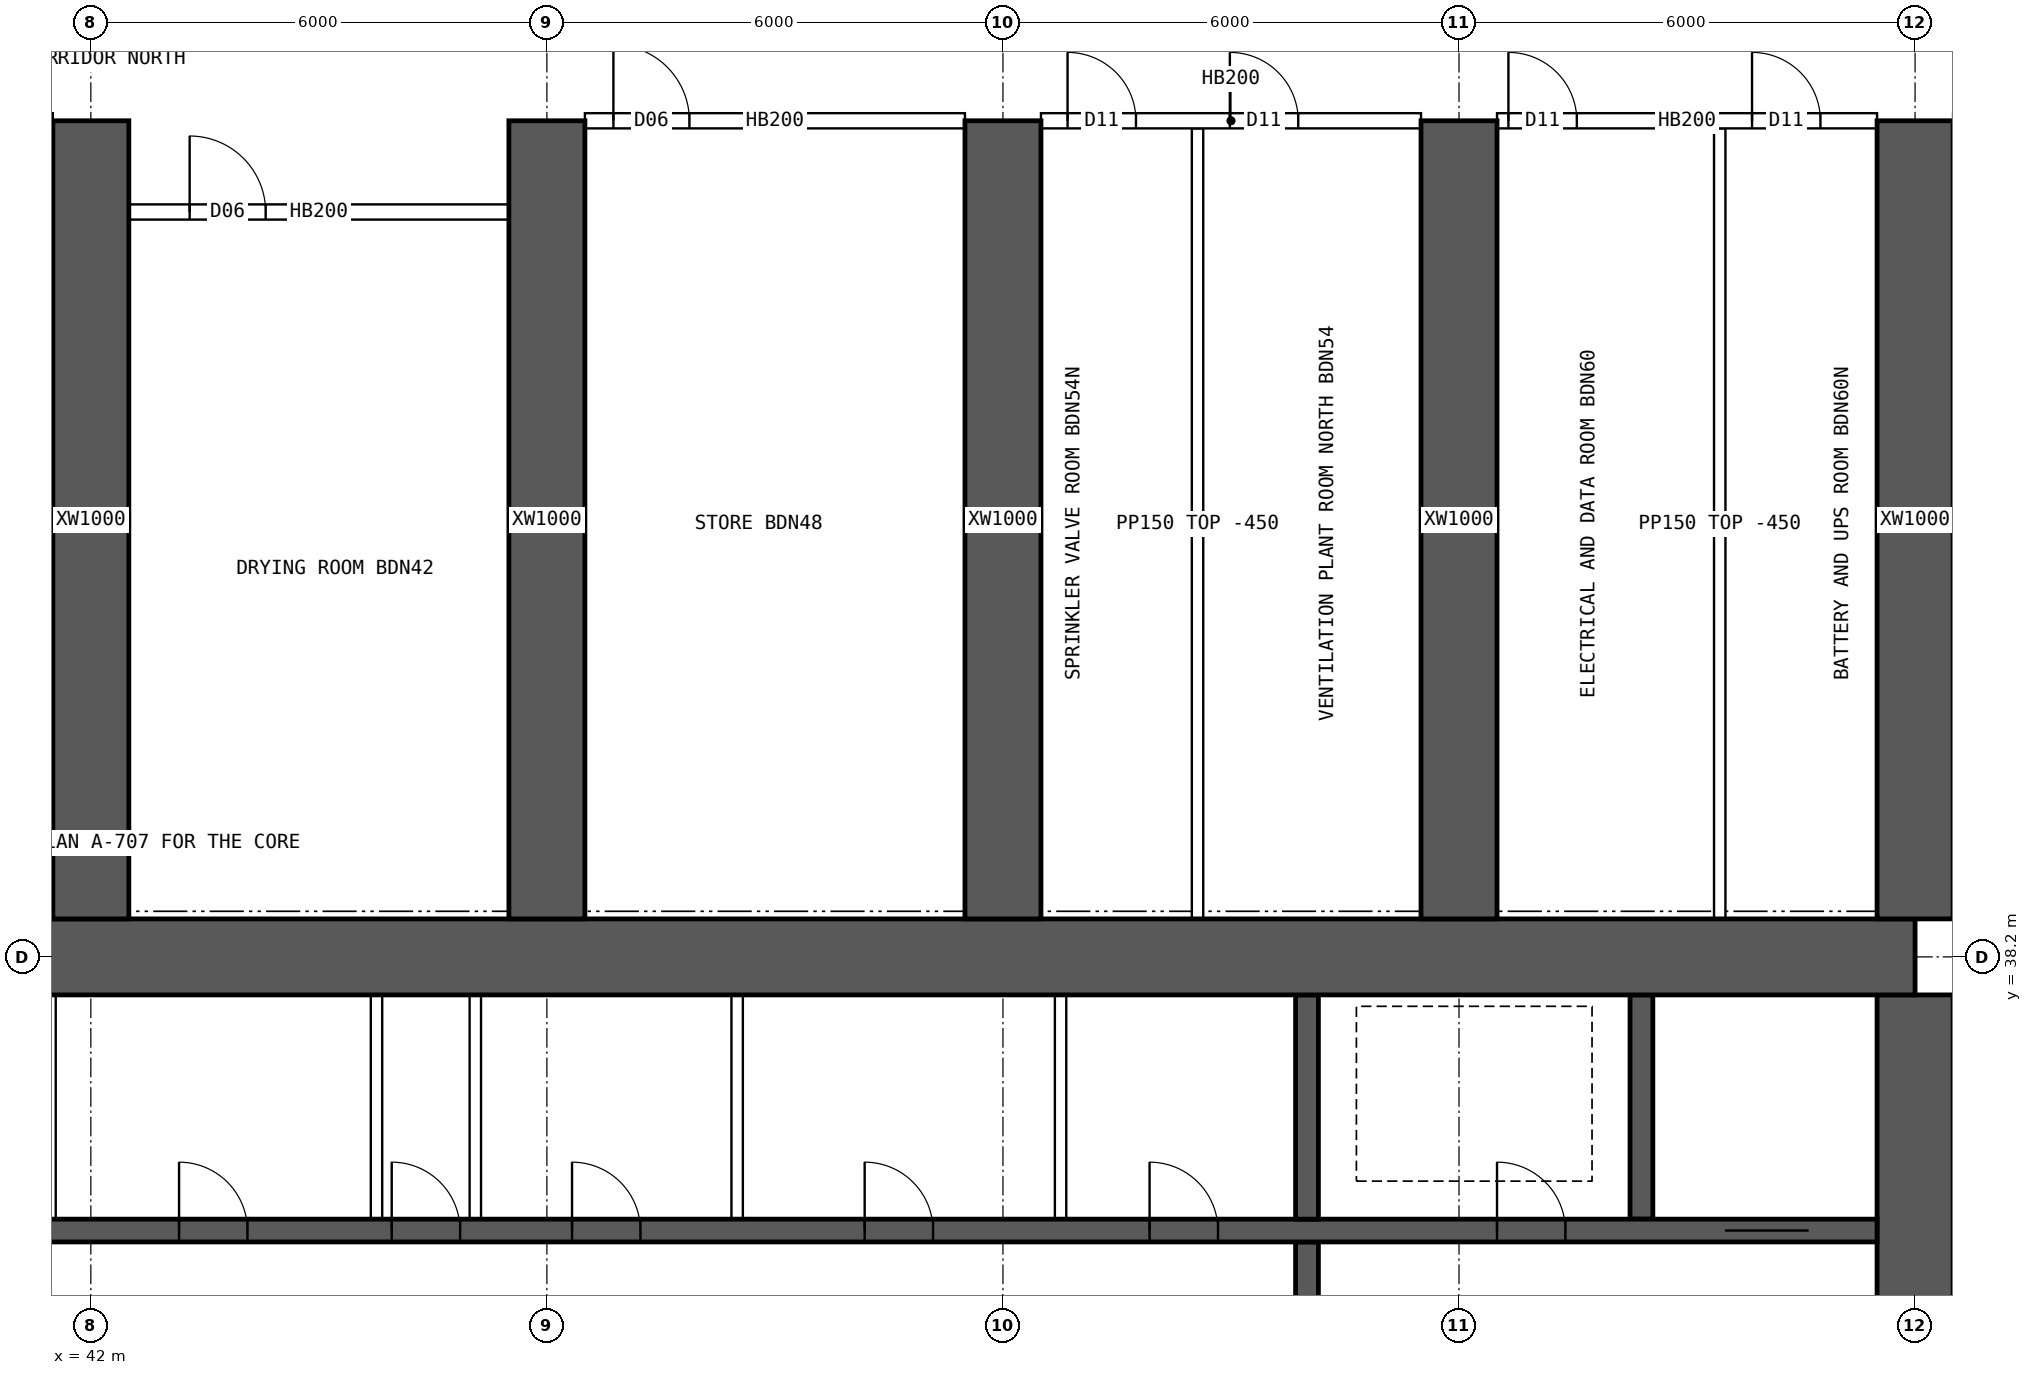
"""IFC4 building model, lengths in metres.
Left out: names, types, materials, properties, quantities, classifications, styles, units other than length and angle.
Written with IfcOpenShell. Run it as: python <this file> out.ifc"""

import sys

from ifc_helpers import new_model, si_unit, direction, frame, frame_2d, origin, place, context, subcontext, project, spatial, rectangle, extrude, element, fill, save


model = new_model("IFC4")
c1 = context("Model", 3, precision=1e-05, world=origin(), true_north=direction((0.0, 1.0)))
c2 = subcontext(c1, "Body", "Model", "MODEL_VIEW")
j1 = project(units=[si_unit("LENGTHUNIT", "METRE"), si_unit("PLANEANGLEUNIT", "RADIAN")], contexts=[c1])
p1 = place(None, origin())
s1 = spatial("IfcSite", under=j1, at=p1, CompositionType="ELEMENT")
p2 = place(p1, origin())
s2 = spatial("IfcBuilding", under=s1, at=p2, CompositionType="ELEMENT")
p3 = place(p2, frame((0.0, 0.0, 20.2)))
s3 = spatial("IfcBuildingStorey", under=s2, at=p3, CompositionType="ELEMENT", Elevation=20.2)
p4 = place(p3, frame((18.0, 38.2, 0.0), z_axis=(0.0, 0.0, 1.0), x_axis=(1.0, 0.0, 0.0)))
e1 = element("IfcWall", 1, at=p4, inside=s3, PredefinedType="SHEAR", context=c2, shape_type="SweptSolid", body=[
    extrude(rectangle(XDim=48.0, YDim=1.0, at=frame_2d((24.0, 0.0))), origin(), (0.0, 0.0, 1.0), 3.75),
])
p5 = place(p3, frame((66.0, 26.3, 0.0), z_axis=(0.0, 0.0, 1.0), x_axis=(0.0, 1.0, 0.0)))
e2 = element("IfcWall", 2, at=p5, inside=s3, PredefinedType="SHEAR", context=c2, shape_type="SweptSolid", body=[
    extrude(rectangle(XDim=11.4, YDim=1.0, at=frame_2d((5.7, 0.0))), origin(), (0.0, 0.0, 1.0), 3.75),
])
p6 = place(p5, frame((5.0, 0.0, 0.0)))
e3 = element("IfcOpeningElement", 3, at=p6, cuts=e2, PredefinedType="OPENING", context=c2, shape_type="SweptSolid", body=[
    extrude(rectangle(XDim=1.2, YDim=2.1, at=frame_2d((0.6, 1.05))), frame((0.0, 0.51, 0.0), z_axis=(0.0, -1.0, 0.0), x_axis=(1.0, 0.0, 0.0)), (0.0, 0.0, 1.0), 1.02),
])
p7 = place(p3, frame((18.5, 34.6, 0.0), z_axis=(0.0, 0.0, 1.0), x_axis=(1.0, 0.0, 0.0)))
e4 = element("IfcWall", 4, at=p7, inside=s3, PredefinedType="SHEAR", context=c2, shape_type="SweptSolid", body=[
    extrude(rectangle(XDim=47.0, YDim=0.3, at=frame_2d((23.5, 0.0))), origin(), (0.0, 0.0, 1.0), 3.75),
])
p8 = place(p7, frame((0.9, 0.0, 0.0)))
e5 = element("IfcOpeningElement", 5, at=p8, cuts=e4, PredefinedType="OPENING", context=c2, shape_type="SweptSolid", body=[
    extrude(rectangle(XDim=1.1, YDim=2.1, at=frame_2d((0.55, 1.05))), frame((0.0, 0.16, 0.0), z_axis=(0.0, -1.0, 0.0), x_axis=(1.0, 0.0, 0.0)), (0.0, 0.0, 1.0), 0.32),
])
p9 = place(p7, frame((45.0, 0.0, 0.0)))
e6 = element("IfcOpeningElement", 6, at=p9, cuts=e4, PredefinedType="OPENING", context=c2, shape_type="SweptSolid", body=[
    extrude(rectangle(XDim=1.1, YDim=2.1, at=frame_2d((0.55, 1.05))), frame((0.0, 0.16, 0.0), z_axis=(0.0, -1.0, 0.0), x_axis=(1.0, 0.0, 0.0)), (0.0, 0.0, 1.0), 0.32),
])
p10 = place(p7, frame((4.1, 0.0, 0.0)))
e7 = element("IfcOpeningElement", 7, at=p10, cuts=e4, PredefinedType="OPENING", context=c2, shape_type="SweptSolid", body=[
    extrude(rectangle(XDim=0.9, YDim=2.1, at=frame_2d((0.45, 1.05))), frame((0.0, 0.16, 0.0), z_axis=(0.0, -1.0, 0.0), x_axis=(1.0, 0.0, 0.0)), (0.0, 0.0, 1.0), 0.32),
])
p11 = place(p7, frame((42.0, 0.0, 0.0)))
e8 = element("IfcOpeningElement", 8, at=p11, cuts=e4, PredefinedType="OPENING", context=c2, shape_type="SweptSolid", body=[
    extrude(rectangle(XDim=0.9, YDim=2.1, at=frame_2d((0.45, 1.05))), frame((0.0, 0.16, 0.0), z_axis=(0.0, -1.0, 0.0), x_axis=(1.0, 0.0, 0.0)), (0.0, 0.0, 1.0), 0.32),
])
p12 = place(p7, frame((8.875, 0.0, 0.0)))
e9 = element("IfcOpeningElement", 9, at=p12, cuts=e4, PredefinedType="OPENING", context=c2, shape_type="SweptSolid", body=[
    extrude(rectangle(XDim=0.9, YDim=2.1, at=frame_2d((0.45, 1.05))), frame((0.0, 0.16, 0.0), z_axis=(0.0, -1.0, 0.0), x_axis=(1.0, 0.0, 0.0)), (0.0, 0.0, 1.0), 0.32),
])
p13 = place(p7, frame((12.849, 0.0, 0.0)))
e10 = element("IfcOpeningElement", 10, at=p13, cuts=e4, PredefinedType="OPENING", context=c2, shape_type="SweptSolid", body=[
    extrude(rectangle(XDim=0.9, YDim=2.1, at=frame_2d((0.45, 1.05))), frame((0.0, 0.16, 0.0), z_axis=(0.0, -1.0, 0.0), x_axis=(1.0, 0.0, 0.0)), (0.0, 0.0, 1.0), 0.32),
])
p14 = place(p7, frame((16.496, 0.0, 0.0)))
e11 = element("IfcOpeningElement", 11, at=p14, cuts=e4, PredefinedType="OPENING", context=c2, shape_type="SweptSolid", body=[
    extrude(rectangle(XDim=0.9, YDim=2.1, at=frame_2d((0.45, 1.05))), frame((0.0, 0.16, 0.0), z_axis=(0.0, -1.0, 0.0), x_axis=(1.0, 0.0, 0.0)), (0.0, 0.0, 1.0), 0.32),
])
p15 = place(p7, frame((20.255, 0.0, 0.0)))
e12 = element("IfcOpeningElement", 12, at=p15, cuts=e4, PredefinedType="OPENING", context=c2, shape_type="SweptSolid", body=[
    extrude(rectangle(XDim=0.9, YDim=2.1, at=frame_2d((0.45, 1.05))), frame((0.0, 0.16, 0.0), z_axis=(0.0, -1.0, 0.0), x_axis=(1.0, 0.0, 0.0)), (0.0, 0.0, 1.0), 0.32),
])
p16 = place(p7, frame((24.661, 0.0, 0.0)))
e13 = element("IfcOpeningElement", 13, at=p16, cuts=e4, PredefinedType="OPENING", context=c2, shape_type="SweptSolid", body=[
    extrude(rectangle(XDim=0.9, YDim=2.1, at=frame_2d((0.45, 1.05))), frame((0.0, 0.16, 0.0), z_axis=(0.0, -1.0, 0.0), x_axis=(1.0, 0.0, 0.0)), (0.0, 0.0, 1.0), 0.32),
])
p17 = place(p7, frame((27.458, 0.0, 0.0)))
e14 = element("IfcOpeningElement", 14, at=p17, cuts=e4, PredefinedType="OPENING", context=c2, shape_type="SweptSolid", body=[
    extrude(rectangle(XDim=0.9, YDim=2.1, at=frame_2d((0.45, 1.05))), frame((0.0, 0.16, 0.0), z_axis=(0.0, -1.0, 0.0), x_axis=(1.0, 0.0, 0.0)), (0.0, 0.0, 1.0), 0.32),
])
p18 = place(p7, frame((29.831, 0.0, 0.0)))
e15 = element("IfcOpeningElement", 15, at=p18, cuts=e4, PredefinedType="OPENING", context=c2, shape_type="SweptSolid", body=[
    extrude(rectangle(XDim=0.9, YDim=2.1, at=frame_2d((0.45, 1.05))), frame((0.0, 0.16, 0.0), z_axis=(0.0, -1.0, 0.0), x_axis=(1.0, 0.0, 0.0)), (0.0, 0.0, 1.0), 0.32),
])
p19 = place(p7, frame((33.68, 0.0, 0.0)))
e16 = element("IfcOpeningElement", 16, at=p19, cuts=e4, PredefinedType="OPENING", context=c2, shape_type="SweptSolid", body=[
    extrude(rectangle(XDim=0.9, YDim=2.1, at=frame_2d((0.45, 1.05))), frame((0.0, 0.16, 0.0), z_axis=(0.0, -1.0, 0.0), x_axis=(1.0, 0.0, 0.0)), (0.0, 0.0, 1.0), 0.32),
])
p20 = place(p7, frame((37.429, 0.0, 0.0)))
e17 = element("IfcOpeningElement", 17, at=p20, cuts=e4, PredefinedType="OPENING", context=c2, shape_type="SweptSolid", body=[
    extrude(rectangle(XDim=0.9, YDim=2.1, at=frame_2d((0.45, 1.05))), frame((0.0, 0.16, 0.0), z_axis=(0.0, -1.0, 0.0), x_axis=(1.0, 0.0, 0.0)), (0.0, 0.0, 1.0), 0.32),
])
p21 = place(p3, frame((58.0, 30.55, 0.0), z_axis=(0.0, 0.0, 1.0), x_axis=(0.0, 1.0, 0.0)))
e18 = element("IfcWall", 18, at=p21, inside=s3, PredefinedType="SHEAR", context=c2, shape_type="SweptSolid", body=[
    extrude(rectangle(XDim=3.9, YDim=0.3, at=frame_2d((1.95, 0.0))), origin(), (0.0, 0.0, 1.0), 3.75),
])
p22 = place(p21, frame((1.4, 0.0, 0.0)))
e19 = element("IfcOpeningElement", 19, at=p22, cuts=e18, PredefinedType="OPENING", context=c2, shape_type="SweptSolid", body=[
    extrude(rectangle(XDim=1.2, YDim=2.1, at=frame_2d((0.6, 1.05))), frame((0.0, 0.16, 0.0), z_axis=(0.0, -1.0, 0.0), x_axis=(1.0, 0.0, 0.0)), (0.0, 0.0, 1.0), 0.32),
])
for number, where, z_axis, x_axis in (
    (20, (62.4, 34.75, 0.0), (0.0, 0.0, 1.0), (0.0, 1.0, 0.0)),
    (21, (58.0, 34.75, 0.0), (0.0, 0.0, 1.0), (0.0, 1.0, 0.0)),
):
    element("IfcWall", number, at=place(p3, frame(where, z_axis=z_axis, x_axis=x_axis)), inside=s3, PredefinedType="SHEAR", context=c2, shape_type="SweptSolid", body=[
        extrude(rectangle(XDim=2.95, YDim=0.3, at=frame_2d((1.475, 0.0))), origin(), (0.0, 0.0, 1.0), 3.75),
    ])
for number, where, z_axis, x_axis in (
    (22, (42.0, 38.7, 0.0), (0.0, 0.0, 1.0), (0.0, 1.0, 0.0)),
    (23, (48.0, 38.7, 0.0), (0.0, 0.0, 1.0), (0.0, 1.0, 0.0)),
    (24, (54.0, 38.7, 0.0), (0.0, 0.0, 1.0), (0.0, 1.0, 0.0)),
    (25, (60.0, 38.7, 0.0), (0.0, 0.0, 1.0), (0.0, 1.0, 0.0)),
    (26, (66.0, 38.7, 0.0), (0.0, 0.0, 1.0), (0.0, 1.0, 0.0)),
):
    element("IfcWall", number, at=place(p3, frame(where, z_axis=z_axis, x_axis=x_axis)), inside=s3, PredefinedType="SHEAR", context=c2, shape_type="SweptSolid", body=[
        extrude(rectangle(XDim=10.5, YDim=1.0, at=frame_2d((5.25, 0.0))), origin(), (0.0, 0.0, 1.0), 3.75),
    ])
for number, where, z_axis, x_axis in (
    (27, (41.463, 34.75, 0.0), (0.0, 0.0, 1.0), (0.0, 1.0, 0.0)),
    (28, (45.758, 34.75, 0.0), (0.0, 0.0, 1.0), (0.0, 1.0, 0.0)),
    (29, (47.058, 34.75, 0.0), (0.0, 0.0, 1.0), (0.0, 1.0, 0.0)),
    (30, (50.503, 34.75, 0.0), (0.0, 0.0, 1.0), (0.0, 1.0, 0.0)),
    (31, (54.758, 34.75, 0.0), (0.0, 0.0, 1.0), (0.0, 1.0, 0.0)),
):
    element("IfcWall", number, at=place(p3, frame(where, z_axis=z_axis, x_axis=x_axis)), inside=s3, PredefinedType="SOLIDWALL", context=c2, shape_type="SweptSolid", body=[
        extrude(rectangle(XDim=2.95, YDim=0.15, at=frame_2d((1.475, 0.0))), origin(), (0.0, 0.0, 1.0), 3.3),
    ])
p23 = place(p3, frame((48.5, 49.2, 0.0), z_axis=(0.0, 0.0, 1.0), x_axis=(1.0, 0.0, 0.0)))
e32 = element("IfcWall", 32, at=p23, inside=s3, PredefinedType="SOLIDWALL", context=c2, shape_type="SweptSolid", body=[
    extrude(rectangle(XDim=5.0, YDim=0.2, at=frame_2d((2.5, 0.0))), origin(), (0.0, 0.0, 1.0), 3.3),
])
p24 = place(p23, frame((0.375, 0.0, 0.0)))
e33 = element("IfcOpeningElement", 33, at=p24, cuts=e32, PredefinedType="OPENING", context=c2, shape_type="SweptSolid", body=[
    extrude(rectangle(XDim=1.0, YDim=2.1, at=frame_2d((0.5, 1.05))), frame((0.0, 0.11, 0.0), z_axis=(0.0, -1.0, 0.0), x_axis=(1.0, 0.0, 0.0)), (0.0, 0.0, 1.0), 0.22),
])
p25 = place(p3, frame((54.5, 49.2, 0.0), z_axis=(0.0, 0.0, 1.0), x_axis=(1.0, 0.0, 0.0)))
e34 = element("IfcWall", 34, at=p25, inside=s3, PredefinedType="SOLIDWALL", context=c2, shape_type="SweptSolid", body=[
    extrude(rectangle(XDim=5.0, YDim=0.2, at=frame_2d((2.5, 0.0))), origin(), (0.0, 0.0, 1.0), 3.3),
])
p26 = place(p25, frame((0.35, 0.0, 0.0)))
e35 = element("IfcOpeningElement", 35, at=p26, cuts=e34, PredefinedType="OPENING", context=c2, shape_type="SweptSolid", body=[
    extrude(rectangle(XDim=0.9, YDim=2.1, at=frame_2d((0.45, 1.05))), frame((0.0, 0.11, 0.0), z_axis=(0.0, -1.0, 0.0), x_axis=(1.0, 0.0, 0.0)), (0.0, 0.0, 1.0), 0.22),
])
p27 = place(p25, frame((2.485, 0.0, 0.0)))
e36 = element("IfcOpeningElement", 36, at=p27, cuts=e34, PredefinedType="OPENING", context=c2, shape_type="SweptSolid", body=[
    extrude(rectangle(XDim=0.9, YDim=2.1, at=frame_2d((0.45, 1.05))), frame((0.0, 0.11, 0.0), z_axis=(0.0, -1.0, 0.0), x_axis=(1.0, 0.0, 0.0)), (0.0, 0.0, 1.0), 0.22),
])
p28 = place(p3, frame((60.5, 49.2, 0.0), z_axis=(0.0, 0.0, 1.0), x_axis=(1.0, 0.0, 0.0)))
e37 = element("IfcWall", 37, at=p28, inside=s3, PredefinedType="SOLIDWALL", context=c2, shape_type="SweptSolid", body=[
    extrude(rectangle(XDim=5.0, YDim=0.2, at=frame_2d((2.5, 0.0))), origin(), (0.0, 0.0, 1.0), 3.3),
])
p29 = place(p28, frame((0.15, 0.0, 0.0)))
e38 = element("IfcOpeningElement", 38, at=p29, cuts=e37, PredefinedType="OPENING", context=c2, shape_type="SweptSolid", body=[
    extrude(rectangle(XDim=0.9, YDim=2.1, at=frame_2d((0.45, 1.05))), frame((0.0, 0.11, 0.0), z_axis=(0.0, -1.0, 0.0), x_axis=(1.0, 0.0, 0.0)), (0.0, 0.0, 1.0), 0.22),
])
p30 = place(p28, frame((3.355, 0.0, 0.0)))
e39 = element("IfcOpeningElement", 39, at=p30, cuts=e37, PredefinedType="OPENING", context=c2, shape_type="SweptSolid", body=[
    extrude(rectangle(XDim=0.9, YDim=2.1, at=frame_2d((0.45, 1.05))), frame((0.0, 0.11, 0.0), z_axis=(0.0, -1.0, 0.0), x_axis=(1.0, 0.0, 0.0)), (0.0, 0.0, 1.0), 0.22),
])
p31 = place(p3, frame((42.5, 48.0, 0.0), z_axis=(0.0, 0.0, 1.0), x_axis=(1.0, 0.0, 0.0)))
e40 = element("IfcWall", 40, at=p31, inside=s3, PredefinedType="SOLIDWALL", context=c2, shape_type="SweptSolid", body=[
    extrude(rectangle(XDim=5.0, YDim=0.2, at=frame_2d((2.5, 0.0))), origin(), (0.0, 0.0, 1.0), 3.3),
])
p32 = place(p31, frame((0.8, 0.0, 0.0)))
e41 = element("IfcOpeningElement", 41, at=p32, cuts=e40, PredefinedType="OPENING", context=c2, shape_type="SweptSolid", body=[
    extrude(rectangle(XDim=1.0, YDim=2.1, at=frame_2d((0.5, 1.05))), frame((0.0, 0.11, 0.0), z_axis=(0.0, -1.0, 0.0), x_axis=(1.0, 0.0, 0.0)), (0.0, 0.0, 1.0), 0.22),
])
for number, where, z_axis, x_axis in (
    (42, (56.56, 38.7, 0.0), (0.0, 0.0, 1.0), (0.0, 1.0, 0.0)),
    (43, (63.43, 38.7, 0.0), (0.0, 0.0, 1.0), (0.0, 1.0, 0.0)),
):
    element("IfcWall", number, at=place(p3, frame(where, z_axis=z_axis, x_axis=x_axis)), inside=s3, PredefinedType="PARTITIONING", context=c2, shape_type="SweptSolid", body=[
        extrude(rectangle(XDim=10.4, YDim=0.15, at=frame_2d((5.2, 0.0))), origin(), (0.0, 0.0, 1.0), 3.3),
    ])
p33 = place(p9, origin())
e44 = element("IfcDoor", 44, at=p33, inside=s3, OperationType="DOUBLE_DOOR_SLIDING", PredefinedType="DOOR", context=c2, shape_type="SweptSolid", body=[
    extrude(rectangle(XDim=1.1, YDim=2.1, at=frame_2d((0.55, 1.05))), frame((0.0, 0.025, 0.0), z_axis=(0.0, -1.0, 0.0), x_axis=(1.0, 0.0, 0.0)), (0.0, 0.0, 1.0), 0.05),
])
fill(e6, e44)
p34 = place(p11, origin())
e45 = element("IfcDoor", 45, at=p34, inside=s3, OperationType="SINGLE_SWING_LEFT", PredefinedType="DOOR", context=c2, shape_type="SweptSolid", body=[
    extrude(rectangle(XDim=0.9, YDim=2.1, at=frame_2d((0.45, 1.05))), frame((0.0, 0.025, 0.0), z_axis=(0.0, -1.0, 0.0), x_axis=(1.0, 0.0, 0.0)), (0.0, 0.0, 1.0), 0.05),
])
fill(e8, e45)
p35 = place(p16, origin())
e46 = element("IfcDoor", 46, at=p35, inside=s3, OperationType="SINGLE_SWING_LEFT", PredefinedType="DOOR", context=c2, shape_type="SweptSolid", body=[
    extrude(rectangle(XDim=0.9, YDim=2.1, at=frame_2d((0.45, 1.05))), frame((0.0, 0.025, 0.0), z_axis=(0.0, -1.0, 0.0), x_axis=(1.0, 0.0, 0.0)), (0.0, 0.0, 1.0), 0.05),
])
fill(e13, e46)
p36 = place(p17, origin())
e47 = element("IfcDoor", 47, at=p36, inside=s3, OperationType="SINGLE_SWING_LEFT", PredefinedType="DOOR", context=c2, shape_type="SweptSolid", body=[
    extrude(rectangle(XDim=0.9, YDim=2.1, at=frame_2d((0.45, 1.05))), frame((0.0, 0.025, 0.0), z_axis=(0.0, -1.0, 0.0), x_axis=(1.0, 0.0, 0.0)), (0.0, 0.0, 1.0), 0.05),
])
fill(e14, e47)
p37 = place(p18, origin())
e48 = element("IfcDoor", 48, at=p37, inside=s3, OperationType="SINGLE_SWING_LEFT", PredefinedType="DOOR", context=c2, shape_type="SweptSolid", body=[
    extrude(rectangle(XDim=0.9, YDim=2.1, at=frame_2d((0.45, 1.05))), frame((0.0, 0.025, 0.0), z_axis=(0.0, -1.0, 0.0), x_axis=(1.0, 0.0, 0.0)), (0.0, 0.0, 1.0), 0.05),
])
fill(e15, e48)
p38 = place(p19, origin())
e49 = element("IfcDoor", 49, at=p38, inside=s3, OperationType="SINGLE_SWING_LEFT", PredefinedType="DOOR", context=c2, shape_type="SweptSolid", body=[
    extrude(rectangle(XDim=0.9, YDim=2.1, at=frame_2d((0.45, 1.05))), frame((0.0, 0.025, 0.0), z_axis=(0.0, -1.0, 0.0), x_axis=(1.0, 0.0, 0.0)), (0.0, 0.0, 1.0), 0.05),
])
fill(e16, e49)
p39 = place(p20, origin())
e50 = element("IfcDoor", 50, at=p39, inside=s3, OperationType="SINGLE_SWING_LEFT", PredefinedType="DOOR", context=c2, shape_type="SweptSolid", body=[
    extrude(rectangle(XDim=0.9, YDim=2.1, at=frame_2d((0.45, 1.05))), frame((0.0, 0.025, 0.0), z_axis=(0.0, -1.0, 0.0), x_axis=(1.0, 0.0, 0.0)), (0.0, 0.0, 1.0), 0.05),
])
fill(e17, e50)
p40 = place(p32, origin())
e51 = element("IfcDoor", 51, at=p40, inside=s3, OperationType="SINGLE_SWING_LEFT", PredefinedType="DOOR", context=c2, shape_type="SweptSolid", body=[
    extrude(rectangle(XDim=1.0, YDim=2.1, at=frame_2d((0.5, 1.05))), frame((0.0, 0.025, 0.0), z_axis=(0.0, -1.0, 0.0), x_axis=(1.0, 0.0, 0.0)), (0.0, 0.0, 1.0), 0.05),
])
fill(e41, e51)
p41 = place(p24, origin())
e52 = element("IfcDoor", 52, at=p41, inside=s3, OperationType="SINGLE_SWING_LEFT", PredefinedType="DOOR", context=c2, shape_type="SweptSolid", body=[
    extrude(rectangle(XDim=1.0, YDim=2.1, at=frame_2d((0.5, 1.05))), frame((0.0, 0.025, 0.0), z_axis=(0.0, -1.0, 0.0), x_axis=(1.0, 0.0, 0.0)), (0.0, 0.0, 1.0), 0.05),
])
fill(e33, e52)
p42 = place(p26, origin())
e53 = element("IfcDoor", 53, at=p42, inside=s3, OperationType="SINGLE_SWING_LEFT", PredefinedType="DOOR", context=c2, shape_type="SweptSolid", body=[
    extrude(rectangle(XDim=0.9, YDim=2.1, at=frame_2d((0.45, 1.05))), frame((0.0, 0.025, 0.0), z_axis=(0.0, -1.0, 0.0), x_axis=(1.0, 0.0, 0.0)), (0.0, 0.0, 1.0), 0.05),
])
fill(e35, e53)
p43 = place(p27, origin())
e54 = element("IfcDoor", 54, at=p43, inside=s3, OperationType="SINGLE_SWING_LEFT", PredefinedType="DOOR", context=c2, shape_type="SweptSolid", body=[
    extrude(rectangle(XDim=0.9, YDim=2.1, at=frame_2d((0.45, 1.05))), frame((0.0, 0.025, 0.0), z_axis=(0.0, -1.0, 0.0), x_axis=(1.0, 0.0, 0.0)), (0.0, 0.0, 1.0), 0.05),
])
fill(e36, e54)
p44 = place(p29, origin())
e55 = element("IfcDoor", 55, at=p44, inside=s3, OperationType="SINGLE_SWING_LEFT", PredefinedType="DOOR", context=c2, shape_type="SweptSolid", body=[
    extrude(rectangle(XDim=0.9, YDim=2.1, at=frame_2d((0.45, 1.05))), frame((0.0, 0.025, 0.0), z_axis=(0.0, -1.0, 0.0), x_axis=(1.0, 0.0, 0.0)), (0.0, 0.0, 1.0), 0.05),
])
fill(e38, e55)
p45 = place(p30, origin())
e56 = element("IfcDoor", 56, at=p45, inside=s3, OperationType="SINGLE_SWING_LEFT", PredefinedType="DOOR", context=c2, shape_type="SweptSolid", body=[
    extrude(rectangle(XDim=0.9, YDim=2.1, at=frame_2d((0.45, 1.05))), frame((0.0, 0.025, 0.0), z_axis=(0.0, -1.0, 0.0), x_axis=(1.0, 0.0, 0.0)), (0.0, 0.0, 1.0), 0.05),
])
fill(e39, e56)
save(model, sys.argv[1])
